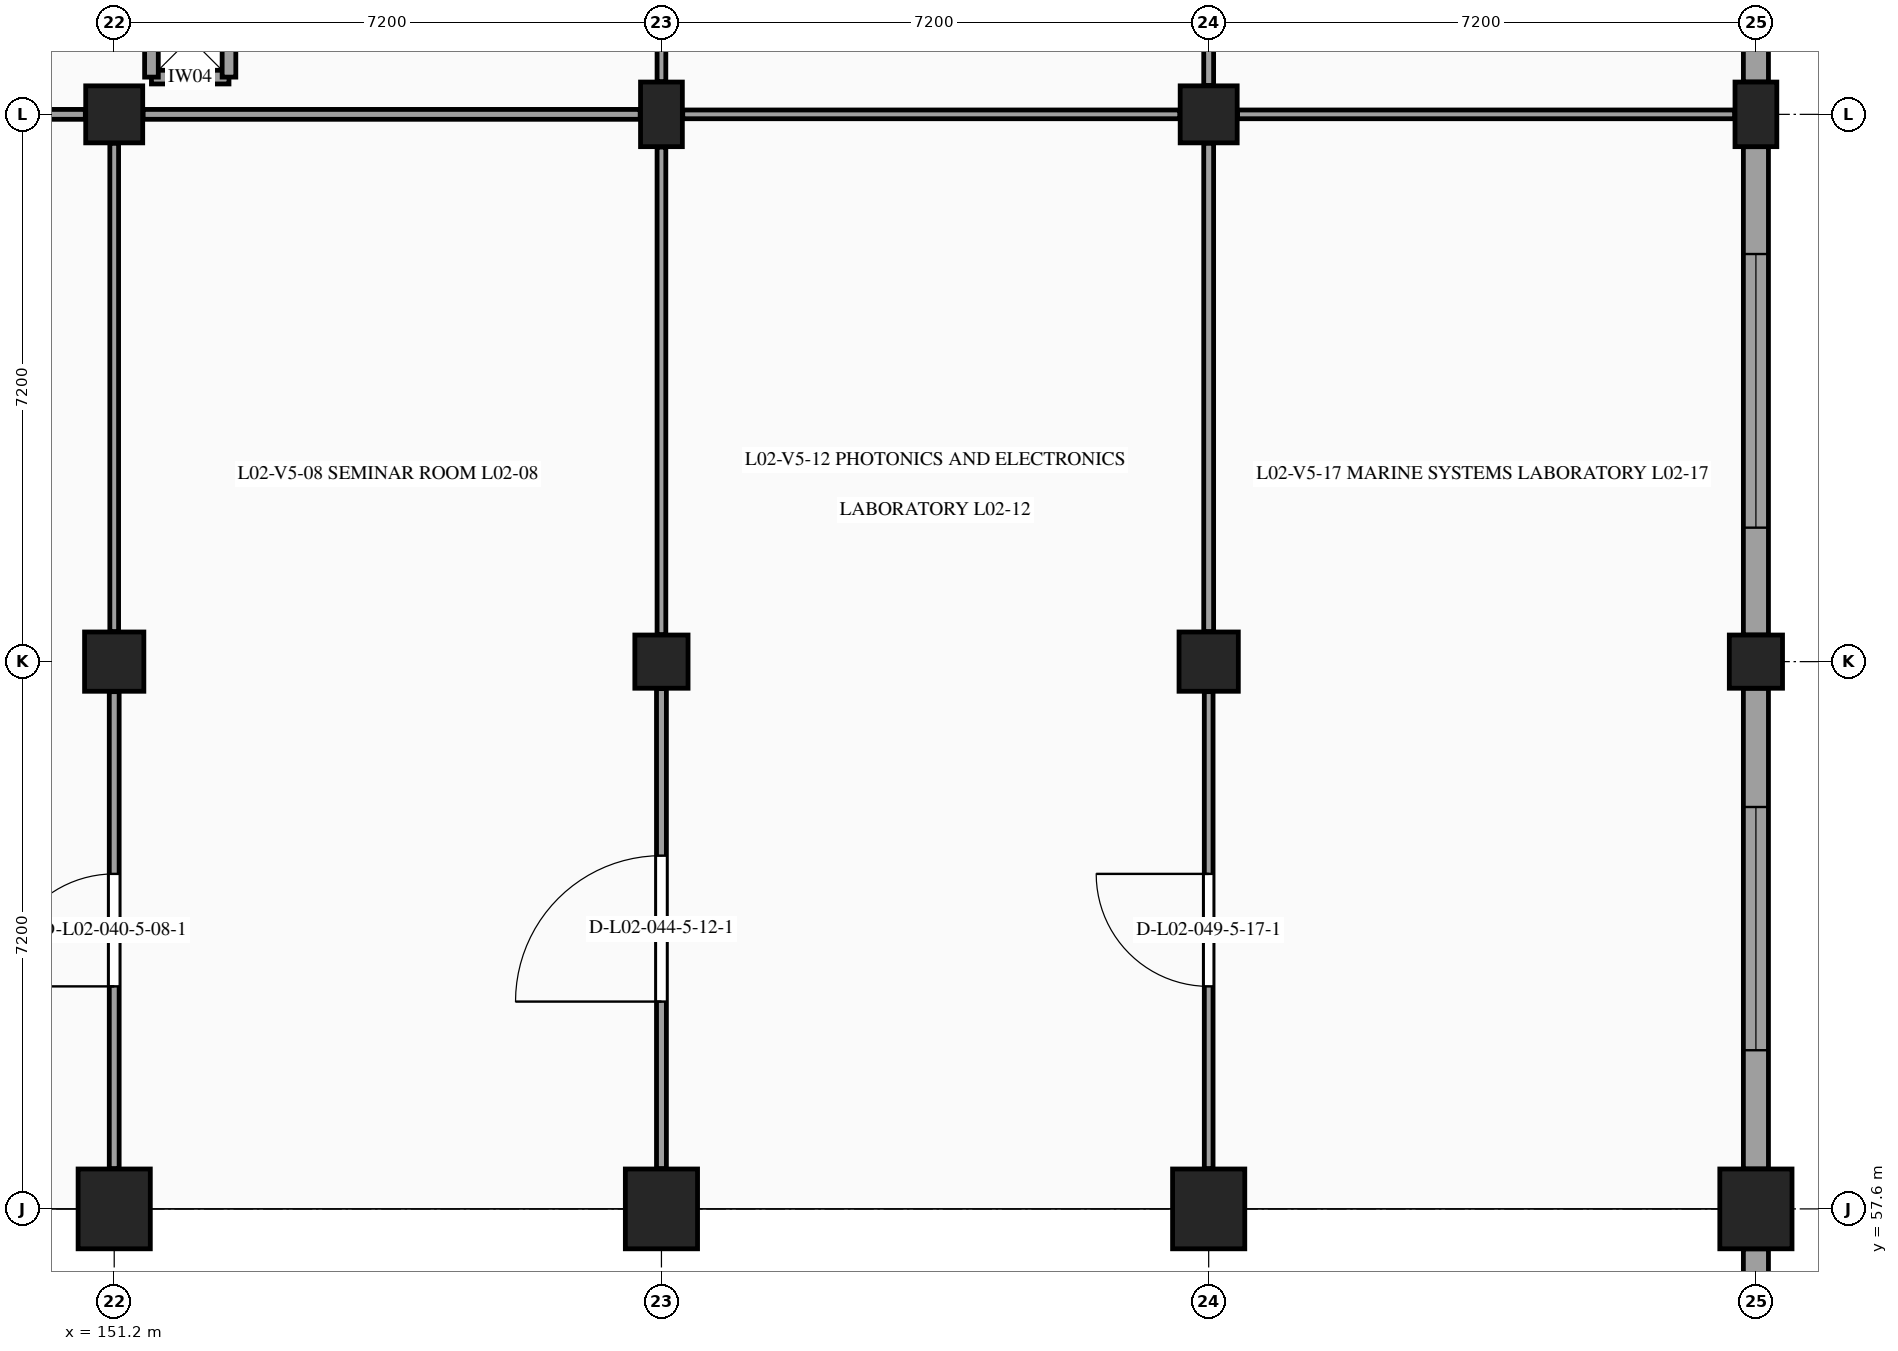
"""IFC4 building model, lengths in metres.
Left out: names, types, materials, properties, quantities, classifications, styles, units other than length and angle.
Written with IfcOpenShell. Run it as: python <this file> out.ifc"""

import sys

from ifc_helpers import new_model, si_unit, direction, frame, frame_2d, origin, origin_2d, place, context, subcontext, project, spatial, rectangle, extrude, element, fill, save


model = new_model("IFC4")
c1 = context("Model", 3, precision=1e-05, world=origin(), true_north=direction((0.0, 1.0)))
c2 = subcontext(c1, "Body", "Model", "MODEL_VIEW")
j1 = project(units=[si_unit("LENGTHUNIT", "METRE"), si_unit("PLANEANGLEUNIT", "RADIAN")], contexts=[c1])
p1 = place(None, origin())
s1 = spatial("IfcSite", under=j1, at=p1, CompositionType="ELEMENT")
p2 = place(p1, origin())
s2 = spatial("IfcBuilding", under=s1, at=p2, CompositionType="ELEMENT")
p3 = place(p2, frame((0.0, 0.0, 9.9)))
s3 = spatial("IfcBuildingStorey", under=s2, at=p3, CompositionType="ELEMENT", Elevation=9.9)
p4 = place(p3, frame((151.2, 57.6, 0.0), z_axis=(0.0, 0.0, 1.0), x_axis=(1.0, 0.0, 0.0)))
e1 = element("IfcColumn", 1, at=p4, inside=s3, PredefinedType="COLUMN", context=c2, shape_type="SweptSolid", body=[
    extrude(rectangle(XDim=0.95, YDim=1.05, at=origin_2d()), origin(), (0.0, 0.0, 1.0), 4.5),
])
p5 = place(p3, frame((151.2, 64.8, 0.0), z_axis=(0.0, 0.0, 1.0), x_axis=(1.0, 0.0, 0.0)))
e2 = element("IfcColumn", 2, at=p5, inside=s3, PredefinedType="COLUMN", context=c2, shape_type="SweptSolid", body=[
    extrude(rectangle(XDim=0.78, YDim=0.78, at=origin_2d()), origin(), (0.0, 0.0, 1.0), 4.5),
])
p6 = place(p3, frame((151.2, 72.0, 0.0), z_axis=(0.0, 0.0, 1.0), x_axis=(1.0, 0.0, 0.0)))
e3 = element("IfcColumn", 3, at=p6, inside=s3, PredefinedType="COLUMN", context=c2, shape_type="SweptSolid", body=[
    extrude(rectangle(XDim=0.75, YDim=0.75, at=origin_2d()), origin(), (0.0, 0.0, 1.0), 4.5),
])
p7 = place(p3, frame((158.4, 57.6, 0.0), z_axis=(0.0, 0.0, 1.0), x_axis=(1.0, 0.0, 0.0)))
e4 = element("IfcColumn", 4, at=p7, inside=s3, PredefinedType="COLUMN", context=c2, shape_type="SweptSolid", body=[
    extrude(rectangle(XDim=0.95, YDim=1.05, at=origin_2d()), origin(), (0.0, 0.0, 1.0), 4.5),
])
p8 = place(p3, frame((158.4, 64.8, 0.0), z_axis=(0.0, 0.0, 1.0), x_axis=(1.0, 0.0, 0.0)))
e5 = element("IfcColumn", 5, at=p8, inside=s3, PredefinedType="COLUMN", context=c2, shape_type="SweptSolid", body=[
    extrude(rectangle(XDim=0.7, YDim=0.7, at=origin_2d()), origin(), (0.0, 0.0, 1.0), 4.5),
])
p9 = place(p3, frame((158.4, 72.0, 0.0), z_axis=(0.0, 0.0, 1.0), x_axis=(1.0, 0.0, 0.0)))
e6 = element("IfcColumn", 6, at=p9, inside=s3, PredefinedType="COLUMN", context=c2, shape_type="SweptSolid", body=[
    extrude(rectangle(XDim=0.55, YDim=0.85, at=origin_2d()), origin(), (0.0, 0.0, 1.0), 4.5),
])
p10 = place(p3, frame((165.6, 57.6, 0.0), z_axis=(0.0, 0.0, 1.0), x_axis=(1.0, 0.0, 0.0)))
e7 = element("IfcColumn", 7, at=p10, inside=s3, PredefinedType="COLUMN", context=c2, shape_type="SweptSolid", body=[
    extrude(rectangle(XDim=0.95, YDim=1.05, at=origin_2d()), origin(), (0.0, 0.0, 1.0), 4.5),
])
p11 = place(p3, frame((165.6, 64.8, 0.0), z_axis=(0.0, 0.0, 1.0), x_axis=(1.0, 0.0, 0.0)))
e8 = element("IfcColumn", 8, at=p11, inside=s3, PredefinedType="COLUMN", context=c2, shape_type="SweptSolid", body=[
    extrude(rectangle(XDim=0.78, YDim=0.78, at=origin_2d()), origin(), (0.0, 0.0, 1.0), 4.5),
])
p12 = place(p3, frame((165.6, 72.0, 0.0), z_axis=(0.0, 0.0, 1.0), x_axis=(1.0, 0.0, 0.0)))
e9 = element("IfcColumn", 9, at=p12, inside=s3, PredefinedType="COLUMN", context=c2, shape_type="SweptSolid", body=[
    extrude(rectangle(XDim=0.75, YDim=0.75, at=origin_2d()), origin(), (0.0, 0.0, 1.0), 4.5),
])
p13 = place(p3, frame((172.8, 57.6, 0.0), z_axis=(0.0, 0.0, 1.0), x_axis=(1.0, 0.0, 0.0)))
e10 = element("IfcColumn", 10, at=p13, inside=s3, PredefinedType="COLUMN", context=c2, shape_type="SweptSolid", body=[
    extrude(rectangle(XDim=0.95, YDim=1.05, at=origin_2d()), origin(), (0.0, 0.0, 1.0), 4.5),
])
p14 = place(p3, frame((172.8, 64.8, 0.0), z_axis=(0.0, 0.0, 1.0), x_axis=(1.0, 0.0, 0.0)))
e11 = element("IfcColumn", 11, at=p14, inside=s3, PredefinedType="COLUMN", context=c2, shape_type="SweptSolid", body=[
    extrude(rectangle(XDim=0.7, YDim=0.7, at=origin_2d()), origin(), (0.0, 0.0, 1.0), 4.5),
])
p15 = place(p3, frame((172.8, 72.0, 0.0), z_axis=(0.0, 0.0, 1.0), x_axis=(1.0, 0.0, 0.0)))
e12 = element("IfcColumn", 12, at=p15, inside=s3, PredefinedType="COLUMN", context=c2, shape_type="SweptSolid", body=[
    extrude(rectangle(XDim=0.55, YDim=0.85, at=origin_2d()), origin(), (0.0, 0.0, 1.0), 4.5),
])
p16 = place(p3, frame((172.8, 78.9, 0.0), z_axis=(0.0, 0.0, 1.0), x_axis=(0.0, -1.0, 0.0)))
e13 = element("IfcWall", 13, at=p16, inside=s3, PredefinedType="STANDARD", context=c2, shape_type="SweptSolid", body=[
    extrude(rectangle(XDim=6.475, YDim=0.33, at=frame_2d((3.237, 0.0))), origin(), (0.0, 0.0, 1.0), 3.47),
])
p17 = place(p16, frame((1.137, 0.0, 0.98)))
e14 = element("IfcOpeningElement", 14, at=p17, cuts=e13, PredefinedType="OPENING", context=c2, shape_type="SweptSolid", body=[
    extrude(rectangle(XDim=4.2, YDim=1.5, at=frame_2d((2.1, 0.75))), frame((0.0, 0.175, 0.0), z_axis=(0.0, -1.0, 0.0), x_axis=(1.0, 0.0, 0.0)), (0.0, 0.0, 1.0), 0.35),
])
p18 = place(p3, frame((172.8, 71.575, 0.0), z_axis=(0.0, 0.0, 1.0), x_axis=(0.0, -1.0, 0.0)))
e15 = element("IfcWall", 15, at=p18, inside=s3, PredefinedType="STANDARD", context=c2, shape_type="SweptSolid", body=[
    extrude(rectangle(XDim=6.425, YDim=0.33, at=frame_2d((3.212, 0.0))), origin(), (0.0, 0.0, 1.0), 3.47),
])
p19 = place(p18, frame((1.413, 0.0, 0.98)))
e16 = element("IfcOpeningElement", 16, at=p19, cuts=e15, PredefinedType="OPENING", context=c2, shape_type="SweptSolid", body=[
    extrude(rectangle(XDim=3.6, YDim=1.5, at=frame_2d((1.8, 0.75))), frame((0.0, 0.175, 0.0), z_axis=(0.0, -1.0, 0.0), x_axis=(1.0, 0.0, 0.0)), (0.0, 0.0, 1.0), 0.35),
])
p20 = place(p3, frame((172.8, 64.45, 0.0), z_axis=(0.0, 0.0, 1.0), x_axis=(0.0, -1.0, 0.0)))
e17 = element("IfcWall", 17, at=p20, inside=s3, PredefinedType="STANDARD", context=c2, shape_type="SweptSolid", body=[
    extrude(rectangle(XDim=6.325, YDim=0.33, at=frame_2d((3.163, 0.0))), origin(), (0.0, 0.0, 1.0), 3.46),
])
p21 = place(p20, frame((1.562, 0.0, 0.98)))
e18 = element("IfcOpeningElement", 18, at=p21, cuts=e17, PredefinedType="OPENING", context=c2, shape_type="SweptSolid", body=[
    extrude(rectangle(XDim=3.2, YDim=1.45, at=frame_2d((1.6, 0.725))), frame((0.0, 0.175, 0.0), z_axis=(0.0, -1.0, 0.0), x_axis=(1.0, 0.0, 0.0)), (0.0, 0.0, 1.0), 0.35),
])
p22 = place(p3, frame((172.8, 57.075, 0.0), z_axis=(0.0, 0.0, 1.0), x_axis=(0.0, -1.0, 0.0)))
e19 = element("IfcWall", 19, at=p22, inside=s3, PredefinedType="STANDARD", context=c2, shape_type="SweptSolid", body=[
    extrude(rectangle(XDim=6.15, YDim=0.33, at=frame_2d((3.075, 0.0))), origin(), (0.0, 0.0, 1.0), 3.745),
])
p23 = place(p22, frame((0.375, 0.0, 1.05)))
e20 = element("IfcOpeningElement", 20, at=p23, cuts=e19, PredefinedType="OPENING", context=c2, shape_type="SweptSolid", body=[
    extrude(rectangle(XDim=5.4, YDim=1.9, at=frame_2d((2.7, 0.95))), frame((0.0, 0.175, 0.0), z_axis=(0.0, -1.0, 0.0), x_axis=(1.0, 0.0, 0.0)), (0.0, 0.0, 1.0), 0.35),
])
for number, where, z_axis, x_axis in (
    (21, (151.69, 72.49, 0.0), (0.0, 0.0, 1.0), (1.0, 0.0, 0.0)),
    (22, (152.71, 72.49, 0.0), (0.0, 0.0, 1.0), (0.0, 1.0, 0.0)),
    (23, (151.69, 73.51, 0.0), (0.0, 0.0, 1.0), (0.0, -1.0, 0.0)),
):
    element("IfcWall", number, at=place(p3, frame(where, z_axis=z_axis, x_axis=x_axis)), inside=s3, PredefinedType="PARTITIONING", context=c2, shape_type="SweptSolid", body=[
        extrude(rectangle(XDim=1.02, YDim=0.18, at=frame_2d((0.51, 0.0))), origin(), (0.0, 0.0, 1.0), 4.225),
    ])
p24 = place(p3, frame((151.2, 58.13, 0.0), z_axis=(0.0, 0.0, 1.0), x_axis=(0.0, 1.0, 0.0)))
e24 = element("IfcWall", 24, at=p24, inside=s3, PredefinedType="PARTITIONING", context=c2, shape_type="SweptSolid", body=[
    extrude(rectangle(XDim=6.275, YDim=0.13, at=frame_2d((3.138, 0.0))), origin(), (0.0, 0.0, 1.0), 3.525),
])
p25 = place(p24, frame((2.397, 0.0, 0.0)))
e25 = element("IfcOpeningElement", 25, at=p25, cuts=e24, PredefinedType="OPENING", context=c2, shape_type="SweptSolid", body=[
    extrude(rectangle(XDim=1.48, YDim=2.28, at=frame_2d((0.74, 1.14))), frame((0.0, 0.075, 0.0), z_axis=(0.0, -1.0, 0.0), x_axis=(1.0, 0.0, 0.0)), (0.0, 0.0, 1.0), 0.15),
])
p26 = place(p3, frame((151.2, 65.195, 0.0), z_axis=(0.0, 0.0, 1.0), x_axis=(0.0, 1.0, 0.0)))
e26 = element("IfcWall", 26, at=p26, inside=s3, PredefinedType="PARTITIONING", context=c2, shape_type="SweptSolid", body=[
    extrude(rectangle(XDim=6.425, YDim=0.115, at=frame_2d((3.212, 0.0))), origin(), (0.0, 0.0, 1.0), 3.53),
])
p27 = place(p3, frame((144.28, 72.0, 0.0), z_axis=(0.0, 0.0, 1.0), x_axis=(1.0, 0.0, 0.0)))
e27 = element("IfcWall", 27, at=p27, inside=s3, PredefinedType="PARTITIONING", context=c2, shape_type="SweptSolid", body=[
    extrude(rectangle(XDim=6.54, YDim=0.13, at=frame_2d((3.27, 0.0))), origin(), (0.0, 0.0, 1.0), 3.485),
])
p28 = place(p27, frame((2.49, 0.0, 0.0)))
e28 = element("IfcOpeningElement", 28, at=p28, cuts=e27, PredefinedType="OPENING", context=c2, shape_type="SweptSolid", body=[
    extrude(rectangle(XDim=1.56, YDim=2.25, at=frame_2d((0.78, 1.125))), frame((0.0, 0.075, 0.0), z_axis=(0.0, -1.0, 0.0), x_axis=(1.0, 0.0, 0.0)), (0.0, 0.0, 1.0), 0.15),
])
p29 = place(p3, frame((158.4, 58.13, 0.0), z_axis=(0.0, 0.0, 1.0), x_axis=(0.0, 1.0, 0.0)))
e29 = element("IfcWall", 29, at=p29, inside=s3, PredefinedType="PARTITIONING", context=c2, shape_type="SweptSolid", body=[
    extrude(rectangle(XDim=6.315, YDim=0.13, at=frame_2d((3.158, 0.0))), origin(), (0.0, 0.0, 1.0), 3.525),
])
p30 = place(p29, frame((2.198, 0.0, 0.0)))
e30 = element("IfcOpeningElement", 30, at=p30, cuts=e29, PredefinedType="OPENING", context=c2, shape_type="SweptSolid", body=[
    extrude(rectangle(XDim=1.92, YDim=2.35, at=frame_2d((0.96, 1.175))), frame((0.0, 0.075, 0.0), z_axis=(0.0, -1.0, 0.0), x_axis=(1.0, 0.0, 0.0)), (0.0, 0.0, 1.0), 0.15),
])
p31 = place(p3, frame((158.4, 65.155, 0.0), z_axis=(0.0, 0.0, 1.0), x_axis=(0.0, 1.0, 0.0)))
e31 = element("IfcWall", 31, at=p31, inside=s3, PredefinedType="PARTITIONING", context=c2, shape_type="SweptSolid", body=[
    extrude(rectangle(XDim=6.415, YDim=0.115, at=frame_2d((3.208, 0.0))), origin(), (0.0, 0.0, 1.0), 3.53),
])
p32 = place(p3, frame((151.58, 72.0, 0.0), z_axis=(0.0, 0.0, 1.0), x_axis=(1.0, 0.0, 0.0)))
e32 = element("IfcWall", 32, at=p32, inside=s3, PredefinedType="PARTITIONING", context=c2, shape_type="SweptSolid", body=[
    extrude(rectangle(XDim=6.54, YDim=0.13, at=frame_2d((3.27, 0.0))), origin(), (0.0, 0.0, 1.0), 3.5),
])
p33 = place(p3, frame((158.4, 72.43, 0.0), z_axis=(0.0, 0.0, 1.0), x_axis=(0.0, 1.0, 0.0)))
e33 = element("IfcWall", 33, at=p33, inside=s3, PredefinedType="PARTITIONING", context=c2, shape_type="SweptSolid", body=[
    extrude(rectangle(XDim=6.465, YDim=0.115, at=frame_2d((3.232, 0.0))), origin(), (0.0, 0.0, 1.0), 3.53),
])
p34 = place(p33, frame((2.353, 0.0, 0.0)))
e34 = element("IfcOpeningElement", 34, at=p34, cuts=e33, PredefinedType="OPENING", context=c2, shape_type="SweptSolid", body=[
    extrude(rectangle(XDim=1.76, YDim=2.3, at=frame_2d((0.88, 1.15))), frame((0.0, 0.067, 0.0), z_axis=(0.0, -1.0, 0.0), x_axis=(1.0, 0.0, 0.0)), (0.0, 0.0, 1.0), 0.135),
])
p35 = place(p3, frame((165.6, 58.13, 0.0), z_axis=(0.0, 0.0, 1.0), x_axis=(0.0, 1.0, 0.0)))
e35 = element("IfcWall", 35, at=p35, inside=s3, PredefinedType="PARTITIONING", context=c2, shape_type="SweptSolid", body=[
    extrude(rectangle(XDim=6.275, YDim=0.115, at=frame_2d((3.138, 0.0))), origin(), (0.0, 0.0, 1.0), 3.525),
])
p36 = place(p35, frame((2.397, 0.0, 0.0)))
e36 = element("IfcOpeningElement", 36, at=p36, cuts=e35, PredefinedType="OPENING", context=c2, shape_type="SweptSolid", body=[
    extrude(rectangle(XDim=1.48, YDim=2.28, at=frame_2d((0.74, 1.14))), frame((0.0, 0.067, 0.0), z_axis=(0.0, -1.0, 0.0), x_axis=(1.0, 0.0, 0.0)), (0.0, 0.0, 1.0), 0.135),
])
p37 = place(p3, frame((165.6, 65.195, 0.0), z_axis=(0.0, 0.0, 1.0), x_axis=(0.0, 1.0, 0.0)))
e37 = element("IfcWall", 37, at=p37, inside=s3, PredefinedType="PARTITIONING", context=c2, shape_type="SweptSolid", body=[
    extrude(rectangle(XDim=6.425, YDim=0.13, at=frame_2d((3.212, 0.0))), origin(), (0.0, 0.0, 1.0), 3.53),
])
p38 = place(p3, frame((158.68, 72.0, 0.0), z_axis=(0.0, 0.0, 1.0), x_axis=(1.0, 0.0, 0.0)))
e38 = element("IfcWall", 38, at=p38, inside=s3, PredefinedType="PARTITIONING", context=c2, shape_type="SweptSolid", body=[
    extrude(rectangle(XDim=6.54, YDim=0.115, at=frame_2d((3.27, 0.0))), origin(), (0.0, 0.0, 1.0), 3.505),
])
p39 = place(p3, frame((165.6, 72.38, 0.0), z_axis=(0.0, 0.0, 1.0), x_axis=(0.0, 1.0, 0.0)))
e39 = element("IfcWall", 39, at=p39, inside=s3, PredefinedType="PARTITIONING", context=c2, shape_type="SweptSolid", body=[
    extrude(rectangle(XDim=6.455, YDim=0.13, at=frame_2d((3.228, 0.0))), origin(), (0.0, 0.0, 1.0), 3.53),
])
p40 = place(p39, frame((2.587, 0.0, 0.0)))
e40 = element("IfcOpeningElement", 40, at=p40, cuts=e39, PredefinedType="OPENING", context=c2, shape_type="SweptSolid", body=[
    extrude(rectangle(XDim=1.28, YDim=2.24, at=frame_2d((0.64, 1.12))), frame((0.0, 0.075, 0.0), z_axis=(0.0, -1.0, 0.0), x_axis=(1.0, 0.0, 0.0)), (0.0, 0.0, 1.0), 0.15),
])
p41 = place(p3, frame((165.98, 72.0, 0.0), z_axis=(0.0, 0.0, 1.0), x_axis=(1.0, 0.0, 0.0)))
e41 = element("IfcWall", 41, at=p41, inside=s3, PredefinedType="PARTITIONING", context=c2, shape_type="SweptSolid", body=[
    extrude(rectangle(XDim=6.54, YDim=0.115, at=frame_2d((3.27, 0.0))), origin(), (0.0, 0.0, 1.0), 3.525),
])
p42 = place(p19, origin())
e42 = element("IfcWindow", 42, at=p42, inside=s3, PartitioningType="SINGLE_PANEL", PredefinedType="WINDOW", context=c2, shape_type="SweptSolid", body=[
    extrude(rectangle(XDim=3.6, YDim=1.5, at=frame_2d((1.8, 0.75))), frame((0.0, -0.03, 0.0), z_axis=(0.0, -1.0, 0.0), x_axis=(1.0, 0.0, 0.0)), (0.0, 0.0, 1.0), 0.06),
])
fill(e16, e42)
p43 = place(p21, origin())
e43 = element("IfcWindow", 43, at=p43, inside=s3, PartitioningType="SINGLE_PANEL", PredefinedType="WINDOW", context=c2, shape_type="SweptSolid", body=[
    extrude(rectangle(XDim=3.2, YDim=1.45, at=frame_2d((1.6, 0.725))), frame((0.0, -0.03, 0.0), z_axis=(0.0, -1.0, 0.0), x_axis=(1.0, 0.0, 0.0)), (0.0, 0.0, 1.0), 0.06),
])
fill(e18, e43)
p44 = place(p25, origin())
e44 = element("IfcDoor", 44, at=p44, inside=s3, OperationType="SINGLE_SWING_LEFT", PredefinedType="DOOR", context=c2, shape_type="SweptSolid", body=[
    extrude(rectangle(XDim=1.48, YDim=2.28, at=frame_2d((0.74, 1.14))), frame((0.0, 0.025, 0.0), z_axis=(0.0, -1.0, 0.0), x_axis=(1.0, 0.0, 0.0)), (0.0, 0.0, 1.0), 0.05),
])
fill(e25, e44)
p45 = place(p30, origin())
e45 = element("IfcDoor", 45, at=p45, inside=s3, OperationType="SINGLE_SWING_LEFT", PredefinedType="DOOR", context=c2, shape_type="SweptSolid", body=[
    extrude(rectangle(XDim=1.92, YDim=2.35, at=frame_2d((0.96, 1.175))), frame((0.0, 0.025, 0.0), z_axis=(0.0, -1.0, 0.0), x_axis=(1.0, 0.0, 0.0)), (0.0, 0.0, 1.0), 0.05),
])
fill(e30, e45)
p46 = place(p36, origin())
e46 = element("IfcDoor", 46, at=p46, inside=s3, OperationType="SINGLE_SWING_RIGHT", PredefinedType="DOOR", context=c2, shape_type="SweptSolid", body=[
    extrude(rectangle(XDim=1.48, YDim=2.28, at=frame_2d((0.74, 1.14))), frame((0.0, 0.025, 0.0), z_axis=(0.0, -1.0, 0.0), x_axis=(1.0, 0.0, 0.0)), (0.0, 0.0, 1.0), 0.05),
])
fill(e36, e46)
save(model, sys.argv[1])
